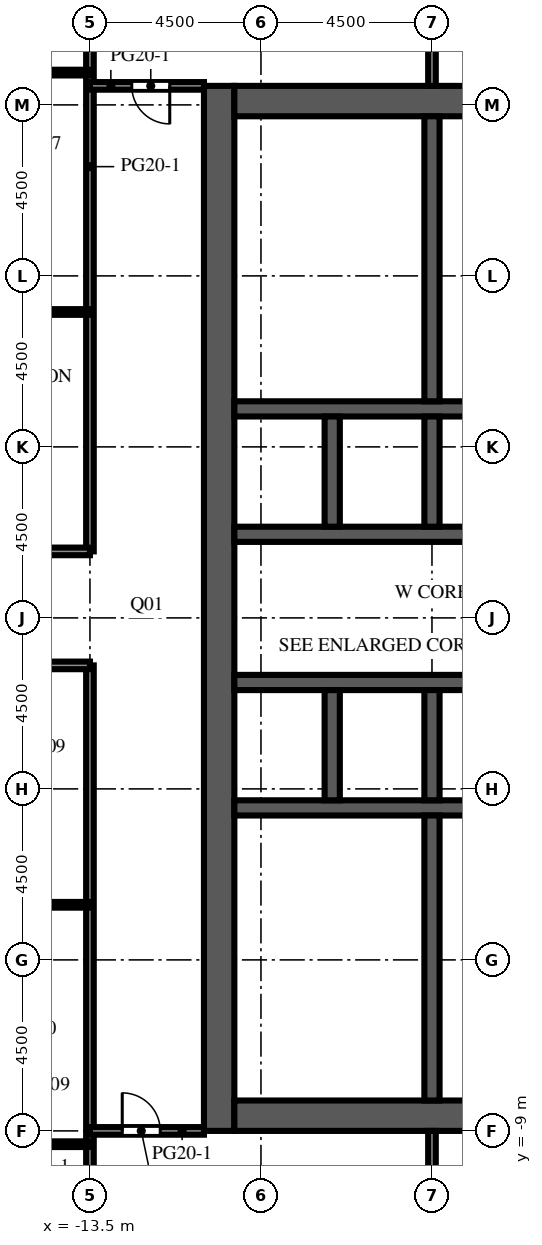
"""IFC4 building model, lengths in metres.
Left out: names, types, materials, properties, quantities, classifications, styles, units other than length and angle.
Written with IfcOpenShell. Run it as: python <this file> out.ifc"""

import sys

from ifc_helpers import new_model, si_unit, direction, frame, frame_2d, origin, place, context, subcontext, project, spatial, rectangle, extrude, element, fill, save


model = new_model("IFC4")
c1 = context("Model", 3, precision=1e-05, world=origin(), true_north=direction((0.0, 1.0)))
c2 = subcontext(c1, "Body", "Model", "MODEL_VIEW")
j1 = project(units=[si_unit("LENGTHUNIT", "METRE"), si_unit("PLANEANGLEUNIT", "RADIAN")], contexts=[c1])
p1 = place(None, origin())
s1 = spatial("IfcSite", under=j1, at=p1, CompositionType="ELEMENT")
p2 = place(p1, origin())
s2 = spatial("IfcBuilding", under=s1, at=p2, CompositionType="ELEMENT")
p3 = place(p2, frame((0.0, 0.0, 212.0)))
s3 = spatial("IfcBuildingStorey", under=s2, at=p3, CompositionType="ELEMENT", Elevation=212.0)
p4 = place(p3, frame((-10.1, -9.0, 0.0), z_axis=(0.0, 0.0, 1.0), x_axis=(0.0, 1.0, 0.0)))
e1 = element("IfcWall", 1, at=p4, inside=s3, PredefinedType="SHEAR", context=c2, shape_type="SweptSolid", body=[
    extrude(rectangle(XDim=27.5, YDim=0.8, at=frame_2d((13.75, 0.0))), origin(), (0.0, 0.0, 1.0), 4.1),
])
p5 = place(p4, frame((12.55, 0.0, 0.0)))
e2 = element("IfcOpeningElement", 2, at=p5, cuts=e1, PredefinedType="OPENING", context=c2, shape_type="SweptSolid", body=[
    extrude(rectangle(XDim=2.4, YDim=2.4, at=frame_2d((1.2, 1.2))), frame((0.0, 0.41, 0.0), z_axis=(0.0, -1.0, 0.0), x_axis=(1.0, 0.0, 0.0)), (0.0, 0.0, 1.0), 0.82),
])
p6 = place(p4, frame((6.825, 0.0, 0.0)))
e3 = element("IfcOpeningElement", 3, at=p6, cuts=e1, PredefinedType="OPENING", context=c2, shape_type="SweptSolid", body=[
    extrude(rectangle(XDim=1.2, YDim=2.1, at=frame_2d((0.6, 1.05))), frame((0.0, 0.41, 0.0), z_axis=(0.0, -1.0, 0.0), x_axis=(1.0, 0.0, 0.0)), (0.0, 0.0, 1.0), 0.82),
])
p7 = place(p4, frame((19.475, 0.0, 0.0)))
e4 = element("IfcOpeningElement", 4, at=p7, cuts=e1, PredefinedType="OPENING", context=c2, shape_type="SweptSolid", body=[
    extrude(rectangle(XDim=1.2, YDim=2.1, at=frame_2d((0.6, 1.05))), frame((0.0, 0.41, 0.0), z_axis=(0.0, -1.0, 0.0), x_axis=(1.0, 0.0, 0.0)), (0.0, 0.0, 1.0), 0.82),
])
for number, where, z_axis, x_axis in (
    (5, (-9.7, -8.6, 0.0), (0.0, 0.0, 1.0), (1.0, 0.0, 0.0)),
    (6, (-9.7, 18.1, 0.0), (0.0, 0.0, 1.0), (1.0, 0.0, 0.0)),
):
    element("IfcWall", number, at=place(p3, frame(where, z_axis=z_axis, x_axis=x_axis)), inside=s3, PredefinedType="SHEAR", context=c2, shape_type="SweptSolid", body=[
        extrude(rectangle(XDim=10.4, YDim=0.8, at=frame_2d((5.2, 0.0))), origin(), (0.0, 0.0, 1.0), 4.1),
    ])
p8 = place(p3, frame((-9.7, -0.5, 0.0), z_axis=(0.0, 0.0, 1.0), x_axis=(1.0, 0.0, 0.0)))
e7 = element("IfcWall", 7, at=p8, inside=s3, PredefinedType="SHEAR", context=c2, shape_type="SweptSolid", body=[
    extrude(rectangle(XDim=10.4, YDim=0.4, at=frame_2d((5.2, 0.0))), origin(), (0.0, 0.0, 1.0), 4.1),
])
p9 = place(p3, frame((-9.7, 2.8, 0.0), z_axis=(0.0, 0.0, 1.0), x_axis=(1.0, 0.0, 0.0)))
e8 = element("IfcWall", 8, at=p9, inside=s3, PredefinedType="SHEAR", context=c2, shape_type="SweptSolid", body=[
    extrude(rectangle(XDim=10.4, YDim=0.4, at=frame_2d((5.2, 0.0))), origin(), (0.0, 0.0, 1.0), 4.1),
])
p10 = place(p9, frame((0.738, 0.0, 0.0)))
e9 = element("IfcOpeningElement", 9, at=p10, cuts=e8, PredefinedType="OPENING", context=c2, shape_type="SweptSolid", body=[
    extrude(rectangle(XDim=1.1, YDim=2.1, at=frame_2d((0.55, 1.05))), frame((0.0, 0.21, 0.0), z_axis=(0.0, -1.0, 0.0), x_axis=(1.0, 0.0, 0.0)), (0.0, 0.0, 1.0), 0.42),
])
p11 = place(p9, frame((3.337, 0.0, 0.0)))
e10 = element("IfcOpeningElement", 10, at=p11, cuts=e8, PredefinedType="OPENING", context=c2, shape_type="SweptSolid", body=[
    extrude(rectangle(XDim=1.1, YDim=2.1, at=frame_2d((0.55, 1.05))), frame((0.0, 0.21, 0.0), z_axis=(0.0, -1.0, 0.0), x_axis=(1.0, 0.0, 0.0)), (0.0, 0.0, 1.0), 0.42),
])
p12 = place(p9, frame((6.012, 0.0, 0.0)))
e11 = element("IfcOpeningElement", 11, at=p12, cuts=e8, PredefinedType="OPENING", context=c2, shape_type="SweptSolid", body=[
    extrude(rectangle(XDim=1.0, YDim=2.1, at=frame_2d((0.5, 1.05))), frame((0.0, 0.21, 0.0), z_axis=(0.0, -1.0, 0.0), x_axis=(1.0, 0.0, 0.0)), (0.0, 0.0, 1.0), 0.42),
])
p13 = place(p9, frame((8.613, 0.0, 0.0)))
e12 = element("IfcOpeningElement", 12, at=p13, cuts=e8, PredefinedType="OPENING", context=c2, shape_type="SweptSolid", body=[
    extrude(rectangle(XDim=1.0, YDim=2.1, at=frame_2d((0.5, 1.05))), frame((0.0, 0.21, 0.0), z_axis=(0.0, -1.0, 0.0), x_axis=(1.0, 0.0, 0.0)), (0.0, 0.0, 1.0), 0.42),
])
p14 = place(p3, frame((-9.7, 6.7, 0.0), z_axis=(0.0, 0.0, 1.0), x_axis=(1.0, 0.0, 0.0)))
e13 = element("IfcWall", 13, at=p14, inside=s3, PredefinedType="SHEAR", context=c2, shape_type="SweptSolid", body=[
    extrude(rectangle(XDim=10.4, YDim=0.4, at=frame_2d((5.2, 0.0))), origin(), (0.0, 0.0, 1.0), 4.1),
])
p15 = place(p14, frame((3.337, 0.0, 0.0)))
e14 = element("IfcOpeningElement", 14, at=p15, cuts=e13, PredefinedType="OPENING", context=c2, shape_type="SweptSolid", body=[
    extrude(rectangle(XDim=1.1, YDim=2.1, at=frame_2d((0.55, 1.05))), frame((0.0, 0.21, 0.0), z_axis=(0.0, -1.0, 0.0), x_axis=(1.0, 0.0, 0.0)), (0.0, 0.0, 1.0), 0.42),
])
p16 = place(p14, frame((5.962, 0.0, 0.0)))
e15 = element("IfcOpeningElement", 15, at=p16, cuts=e13, PredefinedType="OPENING", context=c2, shape_type="SweptSolid", body=[
    extrude(rectangle(XDim=1.1, YDim=2.1, at=frame_2d((0.55, 1.05))), frame((0.0, 0.21, 0.0), z_axis=(0.0, -1.0, 0.0), x_axis=(1.0, 0.0, 0.0)), (0.0, 0.0, 1.0), 0.42),
])
p17 = place(p14, frame((8.663, 0.0, 0.0)))
e16 = element("IfcOpeningElement", 16, at=p17, cuts=e13, PredefinedType="OPENING", context=c2, shape_type="SweptSolid", body=[
    extrude(rectangle(XDim=1.1, YDim=2.1, at=frame_2d((0.55, 1.05))), frame((0.0, 0.21, 0.0), z_axis=(0.0, -1.0, 0.0), x_axis=(1.0, 0.0, 0.0)), (0.0, 0.0, 1.0), 0.42),
])
p18 = place(p14, frame((0.688, 0.0, 0.0)))
e17 = element("IfcOpeningElement", 17, at=p18, cuts=e13, PredefinedType="OPENING", context=c2, shape_type="SweptSolid", body=[
    extrude(rectangle(XDim=1.0, YDim=2.1, at=frame_2d((0.5, 1.05))), frame((0.0, 0.21, 0.0), z_axis=(0.0, -1.0, 0.0), x_axis=(1.0, 0.0, 0.0)), (0.0, 0.0, 1.0), 0.42),
])
p19 = place(p3, frame((-9.7, 10.0, 0.0), z_axis=(0.0, 0.0, 1.0), x_axis=(1.0, 0.0, 0.0)))
e18 = element("IfcWall", 18, at=p19, inside=s3, PredefinedType="SHEAR", context=c2, shape_type="SweptSolid", body=[
    extrude(rectangle(XDim=10.4, YDim=0.4, at=frame_2d((5.2, 0.0))), origin(), (0.0, 0.0, 1.0), 4.1),
])
for number, where, z_axis, x_axis in (
    (19, (-7.125, -0.3, 0.0), (0.0, 0.0, 1.0), (0.0, 1.0, 0.0)),
    (20, (-7.125, 6.9, 0.0), (0.0, 0.0, 1.0), (0.0, 1.0, 0.0)),
    (21, (-4.5, -0.3, 0.0), (0.0, 0.0, 1.0), (0.0, 1.0, 0.0)),
    (22, (-4.5, 6.9, 0.0), (0.0, 0.0, 1.0), (0.0, 1.0, 0.0)),
):
    element("IfcWall", number, at=place(p3, frame(where, z_axis=z_axis, x_axis=x_axis)), inside=s3, PredefinedType="SHEAR", context=c2, shape_type="SweptSolid", body=[
        extrude(rectangle(XDim=2.9, YDim=0.4, at=frame_2d((1.45, 0.0))), origin(), (0.0, 0.0, 1.0), 4.1),
    ])
for number, where, z_axis, x_axis in (
    (23, (-4.5, -8.2, 0.0), (0.0, 0.0, 1.0), (0.0, 1.0, 0.0)),
    (24, (-4.5, 10.2, 0.0), (0.0, 0.0, 1.0), (0.0, 1.0, 0.0)),
):
    element("IfcWall", number, at=place(p3, frame(where, z_axis=z_axis, x_axis=x_axis)), inside=s3, PredefinedType="SHEAR", context=c2, shape_type="SweptSolid", body=[
        extrude(rectangle(XDim=7.5, YDim=0.4, at=frame_2d((3.75, 0.0))), origin(), (0.0, 0.0, 1.0), 4.1),
    ])
for number, where, z_axis, x_axis in (
    (25, (-4.3, -5.95, 0.0), (0.0, 0.0, 1.0), (1.0, 0.0, 0.0)),
    (26, (-4.3, -3.7, 0.0), (0.0, 0.0, 1.0), (1.0, 0.0, 0.0)),
    (27, (-4.3, -2.05, 0.0), (0.0, 0.0, 1.0), (1.0, 0.0, 0.0)),
):
    element("IfcWall", number, at=place(p3, frame(where, z_axis=z_axis, x_axis=x_axis)), inside=s3, PredefinedType="PARTITIONING", context=c2, shape_type="SweptSolid", body=[
        extrude(rectangle(XDim=3.5, YDim=0.1, at=frame_2d((1.75, 0.0))), origin(), (0.0, 0.0, 1.0), 3.65),
    ])
for number, where, z_axis, x_axis in (
    (28, (-4.3, 12.45, 0.0), (0.0, 0.0, 1.0), (1.0, 0.0, 0.0)),
    (29, (-4.3, 14.85, 0.0), (0.0, 0.0, 1.0), (1.0, 0.0, 0.0)),
):
    element("IfcWall", number, at=place(p3, frame(where, z_axis=z_axis, x_axis=x_axis)), inside=s3, PredefinedType="PARTITIONING", context=c2, shape_type="SweptSolid", body=[
        extrude(rectangle(XDim=3.6, YDim=0.1, at=frame_2d((1.8, 0.0))), origin(), (0.0, 0.0, 1.0), 3.65),
    ])
p20 = place(p3, frame((-13.5, -26.5, 0.0), z_axis=(0.0, 0.0, 1.0), x_axis=(0.0, 1.0, 0.0)))
e30 = element("IfcWall", 30, at=p20, inside=s3, PredefinedType="PARTITIONING", context=c2, shape_type="SweptSolid", body=[
    extrude(rectangle(XDim=29.75, YDim=0.2, at=frame_2d((14.875, 0.0))), origin(), (0.0, 0.0, 1.0), 3.65),
])
p21 = place(p3, frame((-13.5, 6.25, 0.0), z_axis=(0.0, 0.0, 1.0), x_axis=(0.0, 1.0, 0.0)))
e31 = element("IfcWall", 31, at=p21, inside=s3, PredefinedType="PARTITIONING", context=c2, shape_type="SweptSolid", body=[
    extrude(rectangle(XDim=20.25, YDim=0.2, at=frame_2d((10.125, 0.0))), origin(), (0.0, 0.0, 1.0), 3.65),
])
p22 = place(p3, frame((-4.5, -26.5, 0.0), z_axis=(0.0, 0.0, 1.0), x_axis=(0.0, 1.0, 0.0)))
e32 = element("IfcWall", 32, at=p22, inside=s3, PredefinedType="PARTITIONING", context=c2, shape_type="SweptSolid", body=[
    extrude(rectangle(XDim=17.5, YDim=0.2, at=frame_2d((8.75, 0.0))), origin(), (0.0, 0.0, 1.0), 3.65),
])
p23 = place(p3, frame((-4.5, 18.5, 0.0), z_axis=(0.0, 0.0, 1.0), x_axis=(0.0, 1.0, 0.0)))
e33 = element("IfcWall", 33, at=p23, inside=s3, PredefinedType="PARTITIONING", context=c2, shape_type="SweptSolid", body=[
    extrude(rectangle(XDim=8.0, YDim=0.2, at=frame_2d((4.0, 0.0))), origin(), (0.0, 0.0, 1.0), 3.65),
])
p24 = place(p3, frame((-13.5, -9.35, 0.0), z_axis=(0.0, 0.0, 1.0), x_axis=(-1.0, 0.0, 0.0)))
e34 = element("IfcWall", 34, at=p24, inside=s3, PredefinedType="PARTITIONING", context=c2, shape_type="SweptSolid", body=[
    extrude(rectangle(XDim=3.9, YDim=0.15, at=frame_2d((1.95, 0.0))), origin(), (0.0, 0.0, 1.0), 3.65),
])
p25 = place(p24, frame((2.65, 0.0, 0.0)))
e35 = element("IfcOpeningElement", 35, at=p25, cuts=e34, PredefinedType="OPENING", context=c2, shape_type="SweptSolid", body=[
    extrude(rectangle(XDim=1.0, YDim=2.1, at=frame_2d((0.5, 1.05))), frame((0.0, 0.085, 0.0), z_axis=(0.0, -1.0, 0.0), x_axis=(1.0, 0.0, 0.0)), (0.0, 0.0, 1.0), 0.17),
])
p26 = place(p3, frame((-10.5, -9.0, 0.0), z_axis=(0.0, 0.0, 1.0), x_axis=(-1.0, 0.0, 0.0)))
e36 = element("IfcWall", 36, at=p26, inside=s3, PredefinedType="PARTITIONING", context=c2, shape_type="SweptSolid", body=[
    extrude(rectangle(XDim=3.0, YDim=0.2, at=frame_2d((1.5, 0.0))), origin(), (0.0, 0.0, 1.0), 3.65),
])
p27 = place(p26, frame((1.15, 0.0, 0.0)))
e37 = element("IfcOpeningElement", 37, at=p27, cuts=e36, PredefinedType="OPENING", context=c2, shape_type="SweptSolid", body=[
    extrude(rectangle(XDim=1.0, YDim=2.1, at=frame_2d((0.5, 1.05))), frame((0.0, 0.11, 0.0), z_axis=(0.0, -1.0, 0.0), x_axis=(1.0, 0.0, 0.0)), (0.0, 0.0, 1.0), 0.22),
])
p28 = place(p3, frame((-13.5, -3.05, 0.0), z_axis=(0.0, 0.0, 1.0), x_axis=(-1.0, 0.0, 0.0)))
e38 = element("IfcWall", 38, at=p28, inside=s3, PredefinedType="PARTITIONING", context=c2, shape_type="SweptSolid", body=[
    extrude(rectangle(XDim=8.85, YDim=0.15, at=frame_2d((4.425, 0.0))), origin(), (0.0, 0.0, 1.0), 3.65),
])
p29 = place(p28, frame((3.4, 0.0, 0.0)))
e39 = element("IfcOpeningElement", 39, at=p29, cuts=e38, PredefinedType="OPENING", context=c2, shape_type="SweptSolid", body=[
    extrude(rectangle(XDim=1.0, YDim=2.1, at=frame_2d((0.5, 1.05))), frame((0.0, 0.085, 0.0), z_axis=(0.0, -1.0, 0.0), x_axis=(1.0, 0.0, 0.0)), (0.0, 0.0, 1.0), 0.17),
])
p30 = place(p3, frame((-13.5, 3.25, 0.0), z_axis=(0.0, 0.0, 1.0), x_axis=(-1.0, 0.0, 0.0)))
e40 = element("IfcWall", 40, at=p30, inside=s3, PredefinedType="PARTITIONING", context=c2, shape_type="SweptSolid", body=[
    extrude(rectangle(XDim=8.85, YDim=0.2, at=frame_2d((4.425, 0.0))), origin(), (0.0, 0.0, 1.0), 3.65),
])
p31 = place(p30, frame((4.65, 0.0, 0.0)))
e41 = element("IfcOpeningElement", 41, at=p31, cuts=e40, PredefinedType="OPENING", context=c2, shape_type="SweptSolid", body=[
    extrude(rectangle(XDim=1.0, YDim=2.1, at=frame_2d((0.5, 1.05))), frame((0.0, 0.11, 0.0), z_axis=(0.0, -1.0, 0.0), x_axis=(1.0, 0.0, 0.0)), (0.0, 0.0, 1.0), 0.22),
])
p32 = place(p3, frame((-22.35, 6.25, 0.0), z_axis=(0.0, 0.0, 1.0), x_axis=(1.0, 0.0, 0.0)))
e42 = element("IfcWall", 42, at=p32, inside=s3, PredefinedType="PARTITIONING", context=c2, shape_type="SweptSolid", body=[
    extrude(rectangle(XDim=8.85, YDim=0.2, at=frame_2d((4.425, 0.0))), origin(), (0.0, 0.0, 1.0), 3.65),
])
p33 = place(p32, frame((4.2, 0.0, 0.0)))
e43 = element("IfcOpeningElement", 43, at=p33, cuts=e42, PredefinedType="OPENING", context=c2, shape_type="SweptSolid", body=[
    extrude(rectangle(XDim=1.0, YDim=2.1, at=frame_2d((0.5, 1.05))), frame((0.0, 0.11, 0.0), z_axis=(0.0, -1.0, 0.0), x_axis=(1.0, 0.0, 0.0)), (0.0, 0.0, 1.0), 0.22),
])
p34 = place(p3, frame((-22.35, 12.55, 0.0), z_axis=(0.0, 0.0, 1.0), x_axis=(1.0, 0.0, 0.0)))
e44 = element("IfcWall", 44, at=p34, inside=s3, PredefinedType="PARTITIONING", context=c2, shape_type="SweptSolid", body=[
    extrude(rectangle(XDim=8.85, YDim=0.15, at=frame_2d((4.425, 0.0))), origin(), (0.0, 0.0, 1.0), 3.65),
])
p35 = place(p34, frame((4.2, 0.0, 0.0)))
e45 = element("IfcOpeningElement", 45, at=p35, cuts=e44, PredefinedType="OPENING", context=c2, shape_type="SweptSolid", body=[
    extrude(rectangle(XDim=1.0, YDim=2.1, at=frame_2d((0.5, 1.05))), frame((0.0, 0.085, 0.0), z_axis=(0.0, -1.0, 0.0), x_axis=(1.0, 0.0, 0.0)), (0.0, 0.0, 1.0), 0.17),
])
p36 = place(p3, frame((-13.5, 18.5, 0.0), z_axis=(0.0, 0.0, 1.0), x_axis=(1.0, 0.0, 0.0)))
e46 = element("IfcWall", 46, at=p36, inside=s3, PredefinedType="PARTITIONING", context=c2, shape_type="SweptSolid", body=[
    extrude(rectangle(XDim=3.0, YDim=0.2, at=frame_2d((1.5, 0.0))), origin(), (0.0, 0.0, 1.0), 3.65),
])
p37 = place(p36, frame((1.1, 0.0, 0.0)))
e47 = element("IfcOpeningElement", 47, at=p37, cuts=e46, PredefinedType="OPENING", context=c2, shape_type="SweptSolid", body=[
    extrude(rectangle(XDim=1.0, YDim=2.1, at=frame_2d((0.5, 1.05))), frame((0.0, 0.11, 0.0), z_axis=(0.0, -1.0, 0.0), x_axis=(1.0, 0.0, 0.0)), (0.0, 0.0, 1.0), 0.22),
])
p38 = place(p3, frame((-22.35, 18.85, 0.0), z_axis=(0.0, 0.0, 1.0), x_axis=(1.0, 0.0, 0.0)))
e48 = element("IfcWall", 48, at=p38, inside=s3, PredefinedType="PARTITIONING", context=c2, shape_type="SweptSolid", body=[
    extrude(rectangle(XDim=8.85, YDim=0.15, at=frame_2d((4.425, 0.0))), origin(), (0.0, 0.0, 1.0), 3.65),
])
p39 = place(p38, frame((5.2, 0.0, 0.0)))
e49 = element("IfcOpeningElement", 49, at=p39, cuts=e48, PredefinedType="OPENING", context=c2, shape_type="SweptSolid", body=[
    extrude(rectangle(XDim=1.0, YDim=2.1, at=frame_2d((0.5, 1.05))), frame((0.0, 0.085, 0.0), z_axis=(0.0, -1.0, 0.0), x_axis=(1.0, 0.0, 0.0)), (0.0, 0.0, 1.0), 0.17),
])
p40 = place(p10, origin())
e50 = element("IfcDoor", 50, at=p40, inside=s3, OperationType="DOUBLE_DOOR_SLIDING", PredefinedType="DOOR", context=c2, shape_type="SweptSolid", body=[
    extrude(rectangle(XDim=1.1, YDim=2.1, at=frame_2d((0.55, 1.05))), frame((0.0, 0.025, 0.0), z_axis=(0.0, -1.0, 0.0), x_axis=(1.0, 0.0, 0.0)), (0.0, 0.0, 1.0), 0.05),
])
fill(e9, e50)
p41 = place(p11, origin())
e51 = element("IfcDoor", 51, at=p41, inside=s3, OperationType="DOUBLE_DOOR_SLIDING", PredefinedType="DOOR", context=c2, shape_type="SweptSolid", body=[
    extrude(rectangle(XDim=1.1, YDim=2.1, at=frame_2d((0.55, 1.05))), frame((0.0, 0.025, 0.0), z_axis=(0.0, -1.0, 0.0), x_axis=(1.0, 0.0, 0.0)), (0.0, 0.0, 1.0), 0.05),
])
fill(e10, e51)
p42 = place(p15, origin())
e52 = element("IfcDoor", 52, at=p42, inside=s3, OperationType="DOUBLE_DOOR_SLIDING", PredefinedType="DOOR", context=c2, shape_type="SweptSolid", body=[
    extrude(rectangle(XDim=1.1, YDim=2.1, at=frame_2d((0.55, 1.05))), frame((0.0, 0.025, 0.0), z_axis=(0.0, -1.0, 0.0), x_axis=(1.0, 0.0, 0.0)), (0.0, 0.0, 1.0), 0.05),
])
fill(e14, e52)
p43 = place(p16, origin())
e53 = element("IfcDoor", 53, at=p43, inside=s3, OperationType="DOUBLE_DOOR_SLIDING", PredefinedType="DOOR", context=c2, shape_type="SweptSolid", body=[
    extrude(rectangle(XDim=1.1, YDim=2.1, at=frame_2d((0.55, 1.05))), frame((0.0, 0.025, 0.0), z_axis=(0.0, -1.0, 0.0), x_axis=(1.0, 0.0, 0.0)), (0.0, 0.0, 1.0), 0.05),
])
fill(e15, e53)
p44 = place(p5, origin())
e54 = element("IfcDoor", 54, at=p44, inside=s3, OperationType="DOUBLE_DOOR_DOUBLE_SWING", PredefinedType="DOOR", context=c2, shape_type="SweptSolid", body=[
    extrude(rectangle(XDim=2.4, YDim=2.4, at=frame_2d((1.2, 1.2))), frame((0.0, 0.025, 0.0), z_axis=(0.0, -1.0, 0.0), x_axis=(1.0, 0.0, 0.0)), (0.0, 0.0, 1.0), 0.05),
])
fill(e2, e54)
p45 = place(p6, origin())
e55 = element("IfcDoor", 55, at=p45, inside=s3, OperationType="SINGLE_SWING_LEFT", PredefinedType="DOOR", context=c2, shape_type="SweptSolid", body=[
    extrude(rectangle(XDim=1.2, YDim=2.1, at=frame_2d((0.6, 1.05))), frame((0.0, 0.025, 0.0), z_axis=(0.0, -1.0, 0.0), x_axis=(1.0, 0.0, 0.0)), (0.0, 0.0, 1.0), 0.05),
])
fill(e3, e55)
p46 = place(p7, origin())
e56 = element("IfcDoor", 56, at=p46, inside=s3, OperationType="SINGLE_SWING_LEFT", PredefinedType="DOOR", context=c2, shape_type="SweptSolid", body=[
    extrude(rectangle(XDim=1.2, YDim=2.1, at=frame_2d((0.6, 1.05))), frame((0.0, 0.025, 0.0), z_axis=(0.0, -1.0, 0.0), x_axis=(1.0, 0.0, 0.0)), (0.0, 0.0, 1.0), 0.05),
])
fill(e4, e56)
p47 = place(p18, origin())
e57 = element("IfcDoor", 57, at=p47, inside=s3, OperationType="SINGLE_SWING_LEFT", PredefinedType="DOOR", context=c2, shape_type="SweptSolid", body=[
    extrude(rectangle(XDim=1.0, YDim=2.1, at=frame_2d((0.5, 1.05))), frame((0.0, 0.025, 0.0), z_axis=(0.0, -1.0, 0.0), x_axis=(1.0, 0.0, 0.0)), (0.0, 0.0, 1.0), 0.05),
])
fill(e17, e57)
p48 = place(p27, origin())
e58 = element("IfcDoor", 58, at=p48, inside=s3, OperationType="SINGLE_SWING_RIGHT", PredefinedType="DOOR", context=c2, shape_type="SweptSolid", body=[
    extrude(rectangle(XDim=1.0, YDim=2.1, at=frame_2d((0.5, 1.05))), frame((0.0, 0.025, 0.0), z_axis=(0.0, -1.0, 0.0), x_axis=(1.0, 0.0, 0.0)), (0.0, 0.0, 1.0), 0.05),
])
fill(e37, e58)
p49 = place(p37, origin())
e59 = element("IfcDoor", 59, at=p49, inside=s3, OperationType="SINGLE_SWING_RIGHT", PredefinedType="DOOR", context=c2, shape_type="SweptSolid", body=[
    extrude(rectangle(XDim=1.0, YDim=2.1, at=frame_2d((0.5, 1.05))), frame((0.0, 0.025, 0.0), z_axis=(0.0, -1.0, 0.0), x_axis=(1.0, 0.0, 0.0)), (0.0, 0.0, 1.0), 0.05),
])
fill(e47, e59)
save(model, sys.argv[1])
